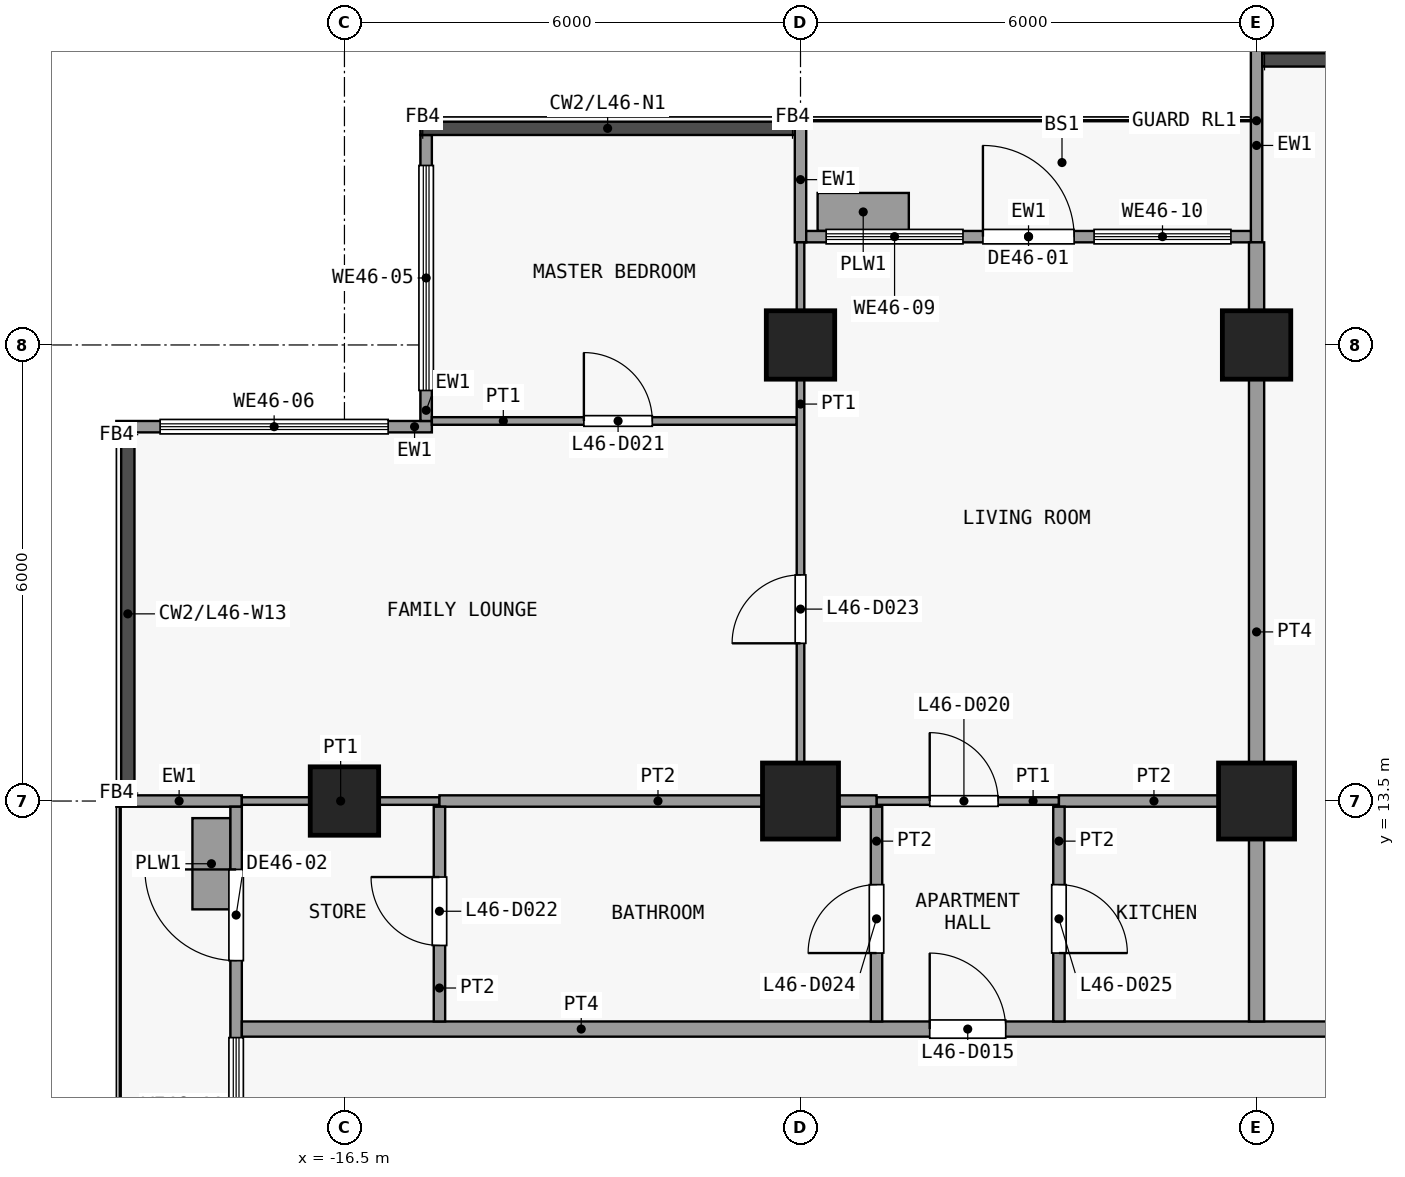
"""IFC4 building model, lengths in metres.
Left out: names, types, materials, properties, quantities, classifications, styles, units other than length and angle.
Written with IfcOpenShell. Run it as: python <this file> out.ifc"""

import sys

from ifc_helpers import new_model, si_unit, direction, frame, frame_2d, origin, origin_2d, place, context, subcontext, project, spatial, rectangle, extrude, element, fill, save


model = new_model("IFC4")
c1 = context("Model", 3, precision=1e-05, world=origin(), true_north=direction((0.0, 1.0)))
c2 = subcontext(c1, "Body", "Model", "MODEL_VIEW")
j1 = project(units=[si_unit("LENGTHUNIT", "METRE"), si_unit("PLANEANGLEUNIT", "RADIAN")], contexts=[c1])
p1 = place(None, origin())
s1 = spatial("IfcSite", under=j1, at=p1, CompositionType="ELEMENT")
p2 = place(p1, origin())
s2 = spatial("IfcBuilding", under=s1, at=p2, CompositionType="ELEMENT")
p3 = place(p2, frame((0.0, 0.0, 185.3)))
s3 = spatial("IfcBuildingStorey", under=s2, at=p3, CompositionType="ELEMENT", Elevation=185.3)
p4 = place(p3, frame((-16.5, 13.5, 0.0), z_axis=(0.0, 0.0, 1.0), x_axis=(1.0, 0.0, 0.0)))
e1 = element("IfcColumn", 1, at=p4, inside=s3, PredefinedType="COLUMN", context=c2, shape_type="SweptSolid", body=[
    extrude(rectangle(XDim=0.9, YDim=0.9, at=origin_2d()), origin(), (0.0, 0.0, 1.0), 3.6),
])
p5 = place(p3, frame((-10.5, 13.5, 0.0), z_axis=(0.0, 0.0, 1.0), x_axis=(1.0, 0.0, 0.0)))
e2 = element("IfcColumn", 2, at=p5, inside=s3, PredefinedType="COLUMN", context=c2, shape_type="SweptSolid", body=[
    extrude(rectangle(XDim=1.0, YDim=1.0, at=origin_2d()), origin(), (0.0, 0.0, 1.0), 3.6),
])
p6 = place(p3, frame((-10.5, 19.5, 0.0), z_axis=(0.0, 0.0, 1.0), x_axis=(1.0, 0.0, 0.0)))
e3 = element("IfcColumn", 3, at=p6, inside=s3, PredefinedType="COLUMN", context=c2, shape_type="SweptSolid", body=[
    extrude(rectangle(XDim=0.9, YDim=0.9, at=origin_2d()), origin(), (0.0, 0.0, 1.0), 3.6),
])
p7 = place(p3, frame((-4.5, 13.5, 0.0), z_axis=(0.0, 0.0, 1.0), x_axis=(1.0, 0.0, 0.0)))
e4 = element("IfcColumn", 4, at=p7, inside=s3, PredefinedType="COLUMN", context=c2, shape_type="SweptSolid", body=[
    extrude(rectangle(XDim=1.0, YDim=1.0, at=origin_2d()), origin(), (0.0, 0.0, 1.0), 3.6),
])
p8 = place(p3, frame((-4.5, 19.5, 0.0), z_axis=(0.0, 0.0, 1.0), x_axis=(1.0, 0.0, 0.0)))
e5 = element("IfcColumn", 5, at=p8, inside=s3, PredefinedType="COLUMN", context=c2, shape_type="SweptSolid", body=[
    extrude(rectangle(XDim=0.9, YDim=0.9, at=origin_2d()), origin(), (0.0, 0.0, 1.0), 3.6),
])
p9 = place(p3, frame((-15.425, 18.5, 0.0), z_axis=(0.0, 0.0, 1.0), x_axis=(0.0, 1.0, 0.0)))
e6 = element("IfcWall", 6, at=p9, inside=s3, PredefinedType="SOLIDWALL", context=c2, shape_type="SweptSolid", body=[
    extrude(rectangle(XDim=3.762, YDim=0.15, at=frame_2d((1.881, 0.0))), origin(), (0.0, 0.0, 1.0), 3.3),
])
p10 = place(p9, frame((0.401, 0.0, 0.9)))
e7 = element("IfcOpeningElement", 7, at=p10, cuts=e6, PredefinedType="OPENING", context=c2, shape_type="SweptSolid", body=[
    extrude(rectangle(XDim=2.96, YDim=2.4, at=frame_2d((1.48, 1.2))), frame((0.0, 0.085, 0.0), z_axis=(0.0, -1.0, 0.0), x_axis=(1.0, 0.0, 0.0)), (0.0, 0.0, 1.0), 0.17),
])
p11 = place(p3, frame((-19.5, 18.425, 0.0), z_axis=(0.0, 0.0, 1.0), x_axis=(1.0, 0.0, 0.0)))
e8 = element("IfcWall", 8, at=p11, inside=s3, PredefinedType="SOLIDWALL", context=c2, shape_type="SweptSolid", body=[
    extrude(rectangle(XDim=4.15, YDim=0.15, at=frame_2d((2.075, 0.0))), origin(), (0.0, 0.0, 1.0), 3.3),
])
p12 = place(p11, frame((0.575, 0.0, 0.9)))
e9 = element("IfcOpeningElement", 9, at=p12, cuts=e8, PredefinedType="OPENING", context=c2, shape_type="SweptSolid", body=[
    extrude(rectangle(XDim=3.0, YDim=2.4, at=frame_2d((1.5, 1.2))), frame((0.0, 0.085, 0.0), z_axis=(0.0, -1.0, 0.0), x_axis=(1.0, 0.0, 0.0)), (0.0, 0.0, 1.0), 0.17),
])
p13 = place(p3, frame((-10.5, 20.85, 0.0), z_axis=(0.0, 0.0, 1.0), x_axis=(0.0, 1.0, 0.0)))
e10 = element("IfcWall", 10, at=p13, inside=s3, PredefinedType="SOLIDWALL", context=c2, shape_type="SweptSolid", body=[
    extrude(rectangle(XDim=1.65, YDim=0.15, at=frame_2d((0.825, 0.0))), origin(), (0.0, 0.0, 1.0), 3.3),
])
p14 = place(p3, frame((-4.5, 20.85, 0.0), z_axis=(0.0, 0.0, 1.0), x_axis=(0.0, 1.0, 0.0)))
e11 = element("IfcWall", 11, at=p14, inside=s3, PredefinedType="SOLIDWALL", context=c2, shape_type="SweptSolid", body=[
    extrude(rectangle(XDim=2.55, YDim=0.15, at=frame_2d((1.275, 0.0))), origin(), (0.0, 0.0, 1.0), 3.3),
])
p15 = place(p3, frame((-10.425, 20.925, 0.0), z_axis=(0.0, 0.0, 1.0), x_axis=(1.0, 0.0, 0.0)))
e12 = element("IfcWall", 12, at=p15, inside=s3, PredefinedType="SOLIDWALL", context=c2, shape_type="SweptSolid", body=[
    extrude(rectangle(XDim=5.85, YDim=0.15, at=frame_2d((2.925, 0.0))), origin(), (0.0, 0.0, 1.0), 3.3),
])
p16 = place(p15, frame((2.325, 0.0, 0.0)))
e13 = element("IfcOpeningElement", 13, at=p16, cuts=e12, PredefinedType="OPENING", context=c2, shape_type="SweptSolid", body=[
    extrude(rectangle(XDim=1.2, YDim=2.4, at=frame_2d((0.6, 1.2))), frame((0.0, 0.085, 0.0), z_axis=(0.0, -1.0, 0.0), x_axis=(1.0, 0.0, 0.0)), (0.0, 0.0, 1.0), 0.17),
])
p17 = place(p15, frame((0.262, 0.0, 0.9)))
e14 = element("IfcOpeningElement", 14, at=p17, cuts=e12, PredefinedType="OPENING", context=c2, shape_type="SweptSolid", body=[
    extrude(rectangle(XDim=1.8, YDim=2.1, at=frame_2d((0.9, 1.05))), frame((0.0, 0.085, 0.0), z_axis=(0.0, -1.0, 0.0), x_axis=(1.0, 0.0, 0.0)), (0.0, 0.0, 1.0), 0.17),
])
p18 = place(p15, frame((3.788, 0.0, 0.9)))
e15 = element("IfcOpeningElement", 15, at=p18, cuts=e12, PredefinedType="OPENING", context=c2, shape_type="SweptSolid", body=[
    extrude(rectangle(XDim=1.8, YDim=2.1, at=frame_2d((0.9, 1.05))), frame((0.0, 0.085, 0.0), z_axis=(0.0, -1.0, 0.0), x_axis=(1.0, 0.0, 0.0)), (0.0, 0.0, 1.0), 0.17),
])
p19 = place(p3, frame((-10.275, 21.25, 0.0), z_axis=(0.0, 0.0, 1.0), x_axis=(1.0, 0.0, 0.0)))
e16 = element("IfcWall", 16, at=p19, inside=s3, PredefinedType="USERDEFINED", context=c2, shape_type="SweptSolid", body=[
    extrude(rectangle(XDim=1.2, YDim=0.5, at=frame_2d((0.6, 0.0))), origin(), (0.0, 0.0, 1.0), 0.9),
])
p20 = place(p3, frame((-17.85, 13.5, 0.0), z_axis=(0.0, 0.0, 1.0), x_axis=(-1.0, 0.0, 0.0)))
e17 = element("IfcWall", 17, at=p20, inside=s3, PredefinedType="SOLIDWALL", context=c2, shape_type="SweptSolid", body=[
    extrude(rectangle(XDim=1.65, YDim=0.15, at=frame_2d((0.825, 0.0))), origin(), (0.0, 0.0, 1.0), 3.3),
])
p21 = place(p3, frame((-17.925, 7.575, 0.0), z_axis=(0.0, 0.0, 1.0), x_axis=(0.0, 1.0, 0.0)))
e18 = element("IfcWall", 18, at=p21, inside=s3, PredefinedType="SOLIDWALL", context=c2, shape_type="SweptSolid", body=[
    extrude(rectangle(XDim=5.85, YDim=0.15, at=frame_2d((2.925, 0.0))), origin(), (0.0, 0.0, 1.0), 3.3),
])
p22 = place(p21, frame((3.825, 0.0, 0.0)))
e19 = element("IfcOpeningElement", 19, at=p22, cuts=e18, PredefinedType="OPENING", context=c2, shape_type="SweptSolid", body=[
    extrude(rectangle(XDim=1.2, YDim=2.4, at=frame_2d((0.6, 1.2))), frame((0.0, 0.085, 0.0), z_axis=(0.0, -1.0, 0.0), x_axis=(1.0, 0.0, 0.0)), (0.0, 0.0, 1.0), 0.17),
])
p23 = place(p21, frame((1.012, 0.0, 0.9)))
e20 = element("IfcOpeningElement", 20, at=p23, cuts=e18, PredefinedType="OPENING", context=c2, shape_type="SweptSolid", body=[
    extrude(rectangle(XDim=1.8, YDim=2.1, at=frame_2d((0.9, 1.05))), frame((0.0, 0.085, 0.0), z_axis=(0.0, -1.0, 0.0), x_axis=(1.0, 0.0, 0.0)), (0.0, 0.0, 1.0), 0.17),
])
p24 = place(p3, frame((-18.25, 12.075, 0.0), z_axis=(0.0, 0.0, 1.0), x_axis=(0.0, 1.0, 0.0)))
e21 = element("IfcWall", 21, at=p24, inside=s3, PredefinedType="USERDEFINED", context=c2, shape_type="SweptSolid", body=[
    extrude(rectangle(XDim=1.2, YDim=0.5, at=frame_2d((0.6, 0.0))), origin(), (0.0, 0.0, 1.0), 0.9),
])
p25 = place(p3, frame((-17.85, 10.5, 0.0), z_axis=(0.0, 0.0, 1.0), x_axis=(1.0, 0.0, 0.0)))
e22 = element("IfcWall", 22, at=p25, inside=s3, PredefinedType="PARTITIONING", context=c2, shape_type="SweptSolid", body=[
    extrude(rectangle(XDim=37.2, YDim=0.2, at=frame_2d((18.6, 0.0))), origin(), (0.0, 0.0, 1.0), 3.3),
])
p26 = place(p25, frame((9.05, 0.0, 0.0)))
e23 = element("IfcOpeningElement", 23, at=p26, cuts=e22, PredefinedType="OPENING", context=c2, shape_type="SweptSolid", body=[
    extrude(rectangle(XDim=1.0, YDim=2.1, at=frame_2d((0.5, 1.05))), frame((0.0, 0.11, 0.0), z_axis=(0.0, -1.0, 0.0), x_axis=(1.0, 0.0, 0.0)), (0.0, 0.0, 1.0), 0.22),
])
p27 = place(p25, frame((17.35, 0.0, 0.0)))
e24 = element("IfcOpeningElement", 24, at=p27, cuts=e22, PredefinedType="OPENING", context=c2, shape_type="SweptSolid", body=[
    extrude(rectangle(XDim=0.9, YDim=2.1, at=frame_2d((0.45, 1.05))), frame((0.0, 0.11, 0.0), z_axis=(0.0, -1.0, 0.0), x_axis=(1.0, 0.0, 0.0)), (0.0, 0.0, 1.0), 0.22),
])
p28 = place(p25, frame((24.85, 0.0, 0.0)))
e25 = element("IfcOpeningElement", 25, at=p28, cuts=e22, PredefinedType="OPENING", context=c2, shape_type="SweptSolid", body=[
    extrude(rectangle(XDim=0.9, YDim=2.1, at=frame_2d((0.45, 1.05))), frame((0.0, 0.11, 0.0), z_axis=(0.0, -1.0, 0.0), x_axis=(1.0, 0.0, 0.0)), (0.0, 0.0, 1.0), 0.22),
])
p29 = place(p25, frame((30.85, 0.0, 0.0)))
e26 = element("IfcOpeningElement", 26, at=p29, cuts=e22, PredefinedType="OPENING", context=c2, shape_type="SweptSolid", body=[
    extrude(rectangle(XDim=0.9, YDim=2.1, at=frame_2d((0.45, 1.05))), frame((0.0, 0.11, 0.0), z_axis=(0.0, -1.0, 0.0), x_axis=(1.0, 0.0, 0.0)), (0.0, 0.0, 1.0), 0.22),
])
p30 = place(p25, frame((35.35, 0.0, 0.0)))
e27 = element("IfcOpeningElement", 27, at=p30, cuts=e22, PredefinedType="OPENING", context=c2, shape_type="SweptSolid", body=[
    extrude(rectangle(XDim=0.9, YDim=2.1, at=frame_2d((0.45, 1.05))), frame((0.0, 0.11, 0.0), z_axis=(0.0, -1.0, 0.0), x_axis=(1.0, 0.0, 0.0)), (0.0, 0.0, 1.0), 0.22),
])
p31 = place(p3, frame((-17.85, 13.5, 0.0), z_axis=(0.0, 0.0, 1.0), x_axis=(1.0, 0.0, 0.0)))
e28 = element("IfcWall", 28, at=p31, inside=s3, PredefinedType="PARTITIONING", context=c2, shape_type="SweptSolid", body=[
    extrude(rectangle(XDim=2.6, YDim=0.1, at=frame_2d((1.3, 0.0))), origin(), (0.0, 0.0, 1.0), 3.3),
])
p32 = place(p3, frame((-9.5, 13.5, 0.0), z_axis=(0.0, 0.0, 1.0), x_axis=(1.0, 0.0, 0.0)))
e29 = element("IfcWall", 29, at=p32, inside=s3, PredefinedType="PARTITIONING", context=c2, shape_type="SweptSolid", body=[
    extrude(rectangle(XDim=2.4, YDim=0.1, at=frame_2d((1.2, 0.0))), origin(), (0.0, 0.0, 1.0), 3.3),
])
p33 = place(p32, frame((0.7, 0.0, 0.0)))
e30 = element("IfcOpeningElement", 30, at=p33, cuts=e29, PredefinedType="OPENING", context=c2, shape_type="SweptSolid", body=[
    extrude(rectangle(XDim=0.9, YDim=2.1, at=frame_2d((0.45, 1.05))), frame((0.0, 0.06, 0.0), z_axis=(0.0, -1.0, 0.0), x_axis=(1.0, 0.0, 0.0)), (0.0, 0.0, 1.0), 0.12),
])
p34 = place(p3, frame((-15.25, 13.5, 0.0), z_axis=(0.0, 0.0, 1.0), x_axis=(1.0, 0.0, 0.0)))
e31 = element("IfcWall", 31, at=p34, inside=s3, PredefinedType="PARTITIONING", context=c2, shape_type="SweptSolid", body=[
    extrude(rectangle(XDim=5.75, YDim=0.15, at=frame_2d((2.875, 0.0))), origin(), (0.0, 0.0, 1.0), 3.3),
])
p35 = place(p3, frame((-7.1, 13.5, 0.0), z_axis=(0.0, 0.0, 1.0), x_axis=(1.0, 0.0, 0.0)))
e32 = element("IfcWall", 32, at=p35, inside=s3, PredefinedType="PARTITIONING", context=c2, shape_type="SweptSolid", body=[
    extrude(rectangle(XDim=2.5, YDim=0.15, at=frame_2d((1.25, 0.0))), origin(), (0.0, 0.0, 1.0), 3.3),
])
p36 = place(p3, frame((-15.35, 18.5, 0.0), z_axis=(0.0, 0.0, 1.0), x_axis=(1.0, 0.0, 0.0)))
e33 = element("IfcWall", 33, at=p36, inside=s3, PredefinedType="PARTITIONING", context=c2, shape_type="SweptSolid", body=[
    extrude(rectangle(XDim=4.8, YDim=0.1, at=frame_2d((2.4, 0.0))), origin(), (0.0, 0.0, 1.0), 3.3),
])
p37 = place(p36, frame((2.0, 0.0, 0.0)))
e34 = element("IfcOpeningElement", 34, at=p37, cuts=e33, PredefinedType="OPENING", context=c2, shape_type="SweptSolid", body=[
    extrude(rectangle(XDim=0.9, YDim=2.1, at=frame_2d((0.45, 1.05))), frame((0.0, 0.06, 0.0), z_axis=(0.0, -1.0, 0.0), x_axis=(1.0, 0.0, 0.0)), (0.0, 0.0, 1.0), 0.12),
])
p38 = place(p3, frame((-15.25, 10.6, 0.0), z_axis=(0.0, 0.0, 1.0), x_axis=(0.0, 1.0, 0.0)))
e35 = element("IfcWall", 35, at=p38, inside=s3, PredefinedType="PARTITIONING", context=c2, shape_type="SweptSolid", body=[
    extrude(rectangle(XDim=2.825, YDim=0.15, at=frame_2d((1.413, 0.0))), origin(), (0.0, 0.0, 1.0), 3.3),
])
p39 = place(p38, frame((1.0, 0.0, 0.0)))
e36 = element("IfcOpeningElement", 36, at=p39, cuts=e35, PredefinedType="OPENING", context=c2, shape_type="SweptSolid", body=[
    extrude(rectangle(XDim=0.9, YDim=2.1, at=frame_2d((0.45, 1.05))), frame((0.0, 0.085, 0.0), z_axis=(0.0, -1.0, 0.0), x_axis=(1.0, 0.0, 0.0)), (0.0, 0.0, 1.0), 0.17),
])
p40 = place(p3, frame((-10.5, 13.575, 0.0), z_axis=(0.0, 0.0, 1.0), x_axis=(0.0, 1.0, 0.0)))
e37 = element("IfcWall", 37, at=p40, inside=s3, PredefinedType="PARTITIONING", context=c2, shape_type="SweptSolid", body=[
    extrude(rectangle(XDim=7.275, YDim=0.1, at=frame_2d((3.638, 0.0))), origin(), (0.0, 0.0, 1.0), 3.3),
])
p41 = place(p40, frame((2.0, 0.0, 0.0)))
e38 = element("IfcOpeningElement", 38, at=p41, cuts=e37, PredefinedType="OPENING", context=c2, shape_type="SweptSolid", body=[
    extrude(rectangle(XDim=0.9, YDim=2.1, at=frame_2d((0.45, 1.05))), frame((0.0, 0.06, 0.0), z_axis=(0.0, -1.0, 0.0), x_axis=(1.0, 0.0, 0.0)), (0.0, 0.0, 1.0), 0.12),
])
p42 = place(p3, frame((-9.5, 10.6, 0.0), z_axis=(0.0, 0.0, 1.0), x_axis=(0.0, 1.0, 0.0)))
e39 = element("IfcWall", 39, at=p42, inside=s3, PredefinedType="PARTITIONING", context=c2, shape_type="SweptSolid", body=[
    extrude(rectangle(XDim=2.825, YDim=0.15, at=frame_2d((1.413, 0.0))), origin(), (0.0, 0.0, 1.0), 3.3),
])
p43 = place(p42, frame((0.9, 0.0, 0.0)))
e40 = element("IfcOpeningElement", 40, at=p43, cuts=e39, PredefinedType="OPENING", context=c2, shape_type="SweptSolid", body=[
    extrude(rectangle(XDim=0.9, YDim=2.1, at=frame_2d((0.45, 1.05))), frame((0.0, 0.085, 0.0), z_axis=(0.0, -1.0, 0.0), x_axis=(1.0, 0.0, 0.0)), (0.0, 0.0, 1.0), 0.17),
])
p44 = place(p3, frame((-7.1, 10.6, 0.0), z_axis=(0.0, 0.0, 1.0), x_axis=(0.0, 1.0, 0.0)))
e41 = element("IfcWall", 41, at=p44, inside=s3, PredefinedType="PARTITIONING", context=c2, shape_type="SweptSolid", body=[
    extrude(rectangle(XDim=2.825, YDim=0.15, at=frame_2d((1.413, 0.0))), origin(), (0.0, 0.0, 1.0), 3.3),
])
p45 = place(p44, frame((0.9, 0.0, 0.0)))
e42 = element("IfcOpeningElement", 42, at=p45, cuts=e41, PredefinedType="OPENING", context=c2, shape_type="SweptSolid", body=[
    extrude(rectangle(XDim=0.9, YDim=2.1, at=frame_2d((0.45, 1.05))), frame((0.0, 0.085, 0.0), z_axis=(0.0, -1.0, 0.0), x_axis=(1.0, 0.0, 0.0)), (0.0, 0.0, 1.0), 0.17),
])
p46 = place(p3, frame((-4.5, 10.6, 0.0), z_axis=(0.0, 0.0, 1.0), x_axis=(0.0, 1.0, 0.0)))
e43 = element("IfcWall", 43, at=p46, inside=s3, PredefinedType="PARTITIONING", context=c2, shape_type="SweptSolid", body=[
    extrude(rectangle(XDim=10.25, YDim=0.2, at=frame_2d((5.125, 0.0))), origin(), (0.0, 0.0, 1.0), 3.3),
])
p47 = place(p10, origin())
e44 = element("IfcWindow", 44, at=p47, inside=s3, PartitioningType="SINGLE_PANEL", PredefinedType="WINDOW", context=c2, shape_type="SweptSolid", body=[
    extrude(rectangle(XDim=2.96, YDim=2.4, at=frame_2d((1.48, 1.2))), frame((0.0, 0.03, 0.0), z_axis=(0.0, -1.0, 0.0), x_axis=(1.0, 0.0, 0.0)), (0.0, 0.0, 1.0), 0.06),
])
fill(e7, e44)
p48 = place(p12, origin())
e45 = element("IfcWindow", 45, at=p48, inside=s3, PartitioningType="SINGLE_PANEL", PredefinedType="WINDOW", context=c2, shape_type="SweptSolid", body=[
    extrude(rectangle(XDim=3.0, YDim=2.4, at=frame_2d((1.5, 1.2))), frame((0.0, 0.03, 0.0), z_axis=(0.0, -1.0, 0.0), x_axis=(1.0, 0.0, 0.0)), (0.0, 0.0, 1.0), 0.06),
])
fill(e9, e45)
p49 = place(p16, origin())
e46 = element("IfcDoor", 46, at=p49, inside=s3, OperationType="SINGLE_SWING_LEFT", PredefinedType="DOOR", context=c2, shape_type="SweptSolid", body=[
    extrude(rectangle(XDim=1.2, YDim=2.4, at=frame_2d((0.6, 1.2))), frame((0.0, 0.025, 0.0), z_axis=(0.0, -1.0, 0.0), x_axis=(1.0, 0.0, 0.0)), (0.0, 0.0, 1.0), 0.05),
])
fill(e13, e46)
p50 = place(p17, origin())
e47 = element("IfcWindow", 47, at=p50, inside=s3, PartitioningType="SINGLE_PANEL", PredefinedType="WINDOW", context=c2, shape_type="SweptSolid", body=[
    extrude(rectangle(XDim=1.8, YDim=2.1, at=frame_2d((0.9, 1.05))), frame((0.0, 0.03, 0.0), z_axis=(0.0, -1.0, 0.0), x_axis=(1.0, 0.0, 0.0)), (0.0, 0.0, 1.0), 0.06),
])
fill(e14, e47)
p51 = place(p18, origin())
e48 = element("IfcWindow", 48, at=p51, inside=s3, PartitioningType="SINGLE_PANEL", PredefinedType="WINDOW", context=c2, shape_type="SweptSolid", body=[
    extrude(rectangle(XDim=1.8, YDim=2.1, at=frame_2d((0.9, 1.05))), frame((0.0, 0.03, 0.0), z_axis=(0.0, -1.0, 0.0), x_axis=(1.0, 0.0, 0.0)), (0.0, 0.0, 1.0), 0.06),
])
fill(e15, e48)
p52 = place(p22, origin())
e49 = element("IfcDoor", 49, at=p52, inside=s3, OperationType="SINGLE_SWING_RIGHT", PredefinedType="DOOR", context=c2, shape_type="SweptSolid", body=[
    extrude(rectangle(XDim=1.2, YDim=2.4, at=frame_2d((0.6, 1.2))), frame((0.0, 0.025, 0.0), z_axis=(0.0, -1.0, 0.0), x_axis=(1.0, 0.0, 0.0)), (0.0, 0.0, 1.0), 0.05),
])
fill(e19, e49)
p53 = place(p23, origin())
e50 = element("IfcWindow", 50, at=p53, inside=s3, PartitioningType="SINGLE_PANEL", PredefinedType="WINDOW", context=c2, shape_type="SweptSolid", body=[
    extrude(rectangle(XDim=1.8, YDim=2.1, at=frame_2d((0.9, 1.05))), frame((0.0, 0.03, 0.0), z_axis=(0.0, -1.0, 0.0), x_axis=(1.0, 0.0, 0.0)), (0.0, 0.0, 1.0), 0.06),
])
fill(e20, e50)
p54 = place(p26, origin())
e51 = element("IfcDoor", 51, at=p54, inside=s3, OperationType="SINGLE_SWING_RIGHT", PredefinedType="DOOR", context=c2, shape_type="SweptSolid", body=[
    extrude(rectangle(XDim=1.0, YDim=2.1, at=frame_2d((0.5, 1.05))), frame((0.0, 0.025, 0.0), z_axis=(0.0, -1.0, 0.0), x_axis=(1.0, 0.0, 0.0)), (0.0, 0.0, 1.0), 0.05),
])
fill(e23, e51)
p55 = place(p33, origin())
e52 = element("IfcDoor", 52, at=p55, inside=s3, OperationType="SINGLE_SWING_RIGHT", PredefinedType="DOOR", context=c2, shape_type="SweptSolid", body=[
    extrude(rectangle(XDim=0.9, YDim=2.1, at=frame_2d((0.45, 1.05))), frame((0.0, 0.025, 0.0), z_axis=(0.0, -1.0, 0.0), x_axis=(1.0, 0.0, 0.0)), (0.0, 0.0, 1.0), 0.05),
])
fill(e30, e52)
p56 = place(p37, origin())
e53 = element("IfcDoor", 53, at=p56, inside=s3, OperationType="SINGLE_SWING_RIGHT", PredefinedType="DOOR", context=c2, shape_type="SweptSolid", body=[
    extrude(rectangle(XDim=0.9, YDim=2.1, at=frame_2d((0.45, 1.05))), frame((0.0, 0.025, 0.0), z_axis=(0.0, -1.0, 0.0), x_axis=(1.0, 0.0, 0.0)), (0.0, 0.0, 1.0), 0.05),
])
fill(e34, e53)
p57 = place(p39, origin())
e54 = element("IfcDoor", 54, at=p57, inside=s3, OperationType="SINGLE_SWING_LEFT", PredefinedType="DOOR", context=c2, shape_type="SweptSolid", body=[
    extrude(rectangle(XDim=0.9, YDim=2.1, at=frame_2d((0.45, 1.05))), frame((0.0, 0.025, 0.0), z_axis=(0.0, -1.0, 0.0), x_axis=(1.0, 0.0, 0.0)), (0.0, 0.0, 1.0), 0.05),
])
fill(e36, e54)
p58 = place(p41, origin())
e55 = element("IfcDoor", 55, at=p58, inside=s3, OperationType="SINGLE_SWING_RIGHT", PredefinedType="DOOR", context=c2, shape_type="SweptSolid", body=[
    extrude(rectangle(XDim=0.9, YDim=2.1, at=frame_2d((0.45, 1.05))), frame((0.0, 0.025, 0.0), z_axis=(0.0, -1.0, 0.0), x_axis=(1.0, 0.0, 0.0)), (0.0, 0.0, 1.0), 0.05),
])
fill(e38, e55)
p59 = place(p43, origin())
e56 = element("IfcDoor", 56, at=p59, inside=s3, OperationType="SINGLE_SWING_RIGHT", PredefinedType="DOOR", context=c2, shape_type="SweptSolid", body=[
    extrude(rectangle(XDim=0.9, YDim=2.1, at=frame_2d((0.45, 1.05))), frame((0.0, 0.025, 0.0), z_axis=(0.0, -1.0, 0.0), x_axis=(1.0, 0.0, 0.0)), (0.0, 0.0, 1.0), 0.05),
])
fill(e40, e56)
p60 = place(p45, origin())
e57 = element("IfcDoor", 57, at=p60, inside=s3, OperationType="SINGLE_SWING_LEFT", PredefinedType="DOOR", context=c2, shape_type="SweptSolid", body=[
    extrude(rectangle(XDim=0.9, YDim=2.1, at=frame_2d((0.45, 1.05))), frame((0.0, 0.025, 0.0), z_axis=(0.0, -1.0, 0.0), x_axis=(1.0, 0.0, 0.0)), (0.0, 0.0, 1.0), 0.05),
])
fill(e42, e57)
save(model, sys.argv[1])
